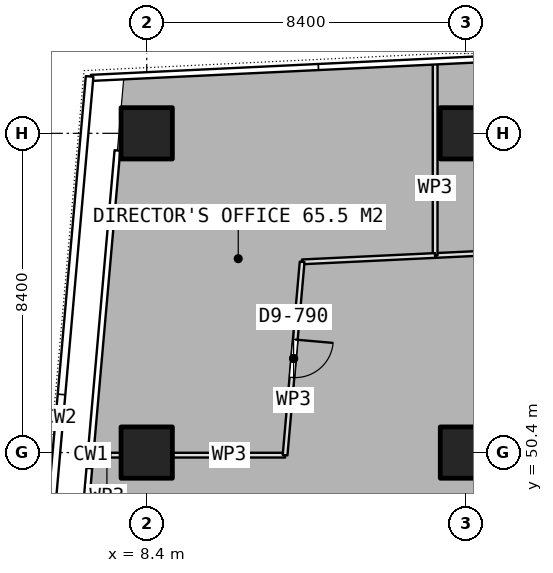
"""IFC4 building model, lengths in metres.
Left out: names, types, materials, properties, quantities, classifications, styles, units other than length and angle.
Written with IfcOpenShell. Run it as: python <this file> out.ifc"""

import sys

from ifc_helpers import new_model, si_unit, direction, frame, frame_2d, origin, origin_2d, place, context, subcontext, project, spatial, rectangle, extrude, element, fill, save


model = new_model("IFC4")
c1 = context("Model", 3, precision=1e-05, world=origin(), true_north=direction((0.0, 1.0)))
c2 = subcontext(c1, "Body", "Model", "MODEL_VIEW")
j1 = project(units=[si_unit("LENGTHUNIT", "METRE"), si_unit("PLANEANGLEUNIT", "RADIAN")], contexts=[c1])
p1 = place(None, origin())
s1 = spatial("IfcSite", under=j1, at=p1, CompositionType="ELEMENT")
p2 = place(p1, origin())
s2 = spatial("IfcBuilding", under=s1, at=p2, CompositionType="ELEMENT")
p3 = place(p2, frame((0.0, 0.0, 195.2)))
s3 = spatial("IfcBuildingStorey", under=s2, at=p3, CompositionType="ELEMENT", Elevation=195.2)
for number, where, z_axis, x_axis in (
    (1, (8.4, 50.4, 0.0), (0.0, 0.0, 1.0), (1.0, 0.0, 0.0)),
    (2, (8.4, 58.8, 0.0), (0.0, 0.0, 1.0), (1.0, 0.0, 0.0)),
    (3, (16.8, 50.4, 0.0), (0.0, 0.0, 1.0), (1.0, 0.0, 0.0)),
    (4, (16.8, 58.8, 0.0), (0.0, 0.0, 1.0), (1.0, 0.0, 0.0)),
):
    element("IfcColumn", number, at=place(p3, frame(where, z_axis=z_axis, x_axis=x_axis)), inside=s3, PredefinedType="COLUMN", context=c2, shape_type="SweptSolid", body=[
        extrude(rectangle(XDim=1.35, YDim=1.35, at=origin_2d()), origin(), (0.0, 0.0, 1.0), 3.75),
    ])
p4 = place(p3, frame((24.317, 55.984, 0.0), z_axis=(0.0, 0.0, 1.0), x_axis=(-0.998859973319, -0.047736293327, 0.0)))
e5 = element("IfcWall", 5, at=p4, inside=s3, PredefinedType="PARTITIONING", context=c2, shape_type="SweptSolid", body=[
    extrude(rectangle(XDim=8.336, YDim=0.125, at=frame_2d((4.168, 0.0))), origin(), (0.0, 0.0, 1.0), 3.5),
])
p5 = place(p4, frame((3.668, 0.0, 0.0)))
e6 = element("IfcOpeningElement", 6, at=p5, cuts=e5, PredefinedType="OPENING", context=c2, shape_type="SweptSolid", body=[
    extrude(rectangle(XDim=1.0, YDim=2.1, at=frame_2d((0.5, 1.05))), frame((0.0, 0.073, 0.0), z_axis=(0.0, -1.0, 0.0), x_axis=(1.0, 0.0, 0.0)), (0.0, 0.0, 1.0), 0.145),
])
p6 = place(p3, frame((15.99, 55.586, 0.0), z_axis=(0.0, 0.0, 1.0), x_axis=(0.0, 1.0, 0.0)))
e7 = element("IfcWall", 7, at=p6, inside=s3, PredefinedType="PARTITIONING", context=c2, shape_type="SweptSolid", body=[
    extrude(rectangle(XDim=5.056, YDim=0.125, at=frame_2d((2.528, 0.0))), origin(), (0.0, 0.0, 1.0), 3.5),
])
p7 = place(p3, frame((12.041, 50.332, 0.0), z_axis=(0.0, 0.0, 1.0), x_axis=(-1.0, 0.0, 0.0)))
e8 = element("IfcWall", 8, at=p7, inside=s3, PredefinedType="PARTITIONING", context=c2, shape_type="SweptSolid", body=[
    extrude(rectangle(XDim=2.946, YDim=0.125, at=frame_2d((1.473, 0.0))), origin(), (0.0, 0.0, 1.0), 3.5),
])
p8 = place(p3, frame((7.705, 50.332, 0.0), z_axis=(0.0, 0.0, 1.0), x_axis=(-1.0, 0.0, 0.0)))
e9 = element("IfcWall", 9, at=p8, inside=s3, PredefinedType="PARTITIONING", context=c2, shape_type="SweptSolid", body=[
    extrude(rectangle(XDim=0.704, YDim=0.125, at=frame_2d((0.352, 0.0))), origin(), (0.0, 0.0, 1.0), 3.5),
])
p9 = place(p3, frame((15.989, 55.586, 0.0), z_axis=(0.0, 0.0, 1.0), x_axis=(-0.998849773225, -0.04794924951, 0.0)))
e10 = element("IfcWall", 10, at=p9, inside=s3, PredefinedType="PARTITIONING", context=c2, shape_type="SweptSolid", body=[
    extrude(rectangle(XDim=3.503, YDim=0.125, at=frame_2d((1.751, 0.0))), origin(), (0.0, 0.0, 1.0), 3.5),
])
p10 = place(p3, frame((12.49, 55.418, 0.0), z_axis=(0.0, 0.0, 1.0), x_axis=(-0.087935675848, -0.99612615512, 0.0)))
e11 = element("IfcWall", 11, at=p10, inside=s3, PredefinedType="PARTITIONING", context=c2, shape_type="SweptSolid", body=[
    extrude(rectangle(XDim=5.106, YDim=0.125, at=frame_2d((2.553, 0.0))), origin(), (0.0, 0.0, 1.0), 3.5),
])
p11 = place(p10, frame((2.053, 0.0, 0.0)))
e12 = element("IfcOpeningElement", 12, at=p11, cuts=e11, PredefinedType="OPENING", context=c2, shape_type="SweptSolid", body=[
    extrude(rectangle(XDim=1.0, YDim=2.1, at=frame_2d((0.5, 1.05))), frame((0.0, 0.073, 0.0), z_axis=(0.0, -1.0, 0.0), x_axis=(1.0, 0.0, 0.0)), (0.0, 0.0, 1.0), 0.145),
])
p12 = place(p11, origin())
e13 = element("IfcDoor", 13, at=p12, inside=s3, OperationType="SINGLE_SWING_LEFT", PredefinedType="DOOR", context=c2, shape_type="SweptSolid", body=[
    extrude(rectangle(XDim=1.0, YDim=2.1, at=frame_2d((0.5, 1.05))), frame((0.0, 0.025, 0.0), z_axis=(0.0, -1.0, 0.0), x_axis=(1.0, 0.0, 0.0)), (0.0, 0.0, 1.0), 0.05),
])
fill(e12, e13)
save(model, sys.argv[1])
